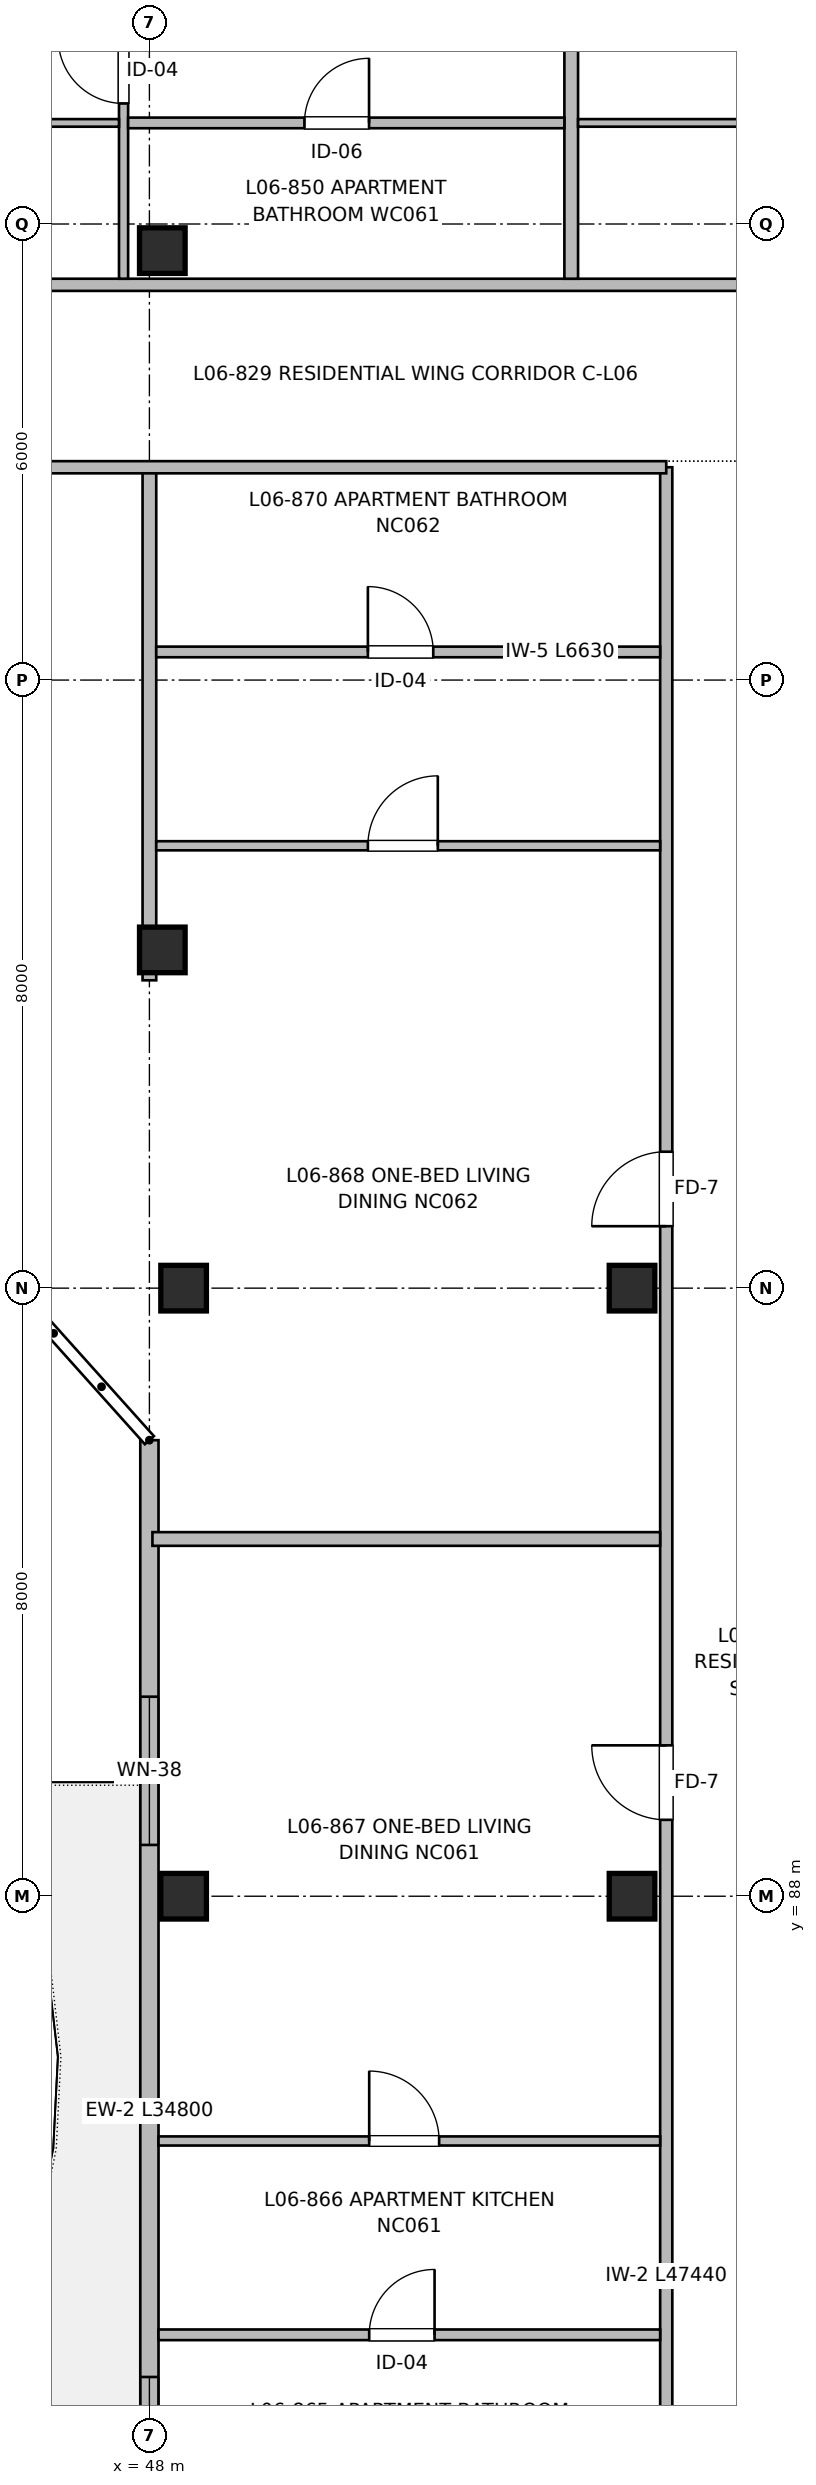
"""IFC4 building model, lengths in metres.
Left out: names, types, materials, properties, quantities, classifications, styles, units other than length and angle.
Written with IfcOpenShell. Run it as: python <this file> out.ifc"""

import sys

from ifc_helpers import new_model, si_unit, direction, frame, frame_2d, origin, origin_2d, place, context, subcontext, project, spatial, rectangle, extrude, element, fill, save


model = new_model("IFC4")
c1 = context("Model", 3, precision=1e-05, world=origin(), true_north=direction((0.0, 1.0)))
c2 = subcontext(c1, "Body", "Model", "MODEL_VIEW")
j1 = project(units=[si_unit("LENGTHUNIT", "METRE"), si_unit("PLANEANGLEUNIT", "RADIAN")], contexts=[c1])
p1 = place(None, origin())
s1 = spatial("IfcSite", under=j1, at=p1, CompositionType="ELEMENT")
p2 = place(p1, origin())
s2 = spatial("IfcBuilding", under=s1, at=p2, CompositionType="ELEMENT")
p3 = place(p2, frame((0.0, 0.0, 20.16)))
s3 = spatial("IfcBuildingStorey", under=s2, at=p3, CompositionType="ELEMENT", Elevation=20.16)
for number, where, z_axis, x_axis in (
    (1, (48.17, 100.45, 0.0), (0.0, 0.0, 1.0), (1.0, 0.0, 0.0)),
    (2, (48.17, 109.65, 0.0), (0.0, 0.0, 1.0), (1.0, 0.0, 0.0)),
    (3, (48.45, 88.0, 0.0), (0.0, 0.0, 1.0), (1.0, 0.0, 0.0)),
    (4, (48.45, 96.0, 0.0), (0.0, 0.0, 1.0), (1.0, 0.0, 0.0)),
    (5, (54.35, 88.0, 0.0), (0.0, 0.0, 1.0), (1.0, 0.0, 0.0)),
    (6, (54.35, 96.0, 0.0), (0.0, 0.0, 1.0), (1.0, 0.0, 0.0)),
):
    element("IfcColumn", number, at=place(p3, frame(where, z_axis=z_axis, x_axis=x_axis)), inside=s3, PredefinedType="COLUMN", context=c2, shape_type="SweptSolid", body=[
        extrude(rectangle(XDim=0.6, YDim=0.6, at=origin_2d()), origin(), (0.0, 0.0, 1.0), 3.2),
    ])
p4 = place(p3, frame((48.0, 59.2, 0.0), z_axis=(0.0, 0.0, 1.0), x_axis=(0.0, 1.0, 0.0)))
e7 = element("IfcWall", 7, at=p4, inside=s3, PredefinedType="SOLIDWALL", context=c2, shape_type="SweptSolid", body=[
    extrude(rectangle(XDim=34.8, YDim=0.24, at=frame_2d((17.4, 0.0))), origin(), (0.0, 0.0, 1.0), 2.98),
])
p5 = place(p4, frame((2.55, 0.0, 0.0)))
e8 = element("IfcOpeningElement", 8, at=p5, cuts=e7, PredefinedType="OPENING", context=c2, shape_type="SweptSolid", body=[
    extrude(rectangle(XDim=1.2, YDim=2.2, at=frame_2d((0.6, 1.1))), frame((0.0, 0.13, 0.0), z_axis=(0.0, -1.0, 0.0), x_axis=(1.0, 0.0, 0.0)), (0.0, 0.0, 1.0), 0.26),
])
p6 = place(p4, frame((5.65, 0.0, 0.77)))
e9 = element("IfcOpeningElement", 9, at=p6, cuts=e7, PredefinedType="OPENING", context=c2, shape_type="SweptSolid", body=[
    extrude(rectangle(XDim=1.65, YDim=1.45, at=frame_2d((0.825, 0.725))), frame((0.0, 0.13, 0.0), z_axis=(0.0, -1.0, 0.0), x_axis=(1.0, 0.0, 0.0)), (0.0, 0.0, 1.0), 0.26),
])
p7 = place(p4, frame((11.9, 0.0, 0.57)))
e10 = element("IfcOpeningElement", 10, at=p7, cuts=e7, PredefinedType="OPENING", context=c2, shape_type="SweptSolid", body=[
    extrude(rectangle(XDim=2.3, YDim=1.65, at=frame_2d((1.15, 0.825))), frame((0.0, 0.13, 0.0), z_axis=(0.0, -1.0, 0.0), x_axis=(1.0, 0.0, 0.0)), (0.0, 0.0, 1.0), 0.26),
])
p8 = place(p4, frame((21.025, 0.0, 0.77)))
e11 = element("IfcOpeningElement", 11, at=p8, cuts=e7, PredefinedType="OPENING", context=c2, shape_type="SweptSolid", body=[
    extrude(rectangle(XDim=1.45, YDim=1.45, at=frame_2d((0.725, 0.725))), frame((0.0, 0.13, 0.0), z_axis=(0.0, -1.0, 0.0), x_axis=(1.0, 0.0, 0.0)), (0.0, 0.0, 1.0), 0.26),
])
p9 = place(p4, frame((29.475, 0.0, 0.72)))
e12 = element("IfcOpeningElement", 12, at=p9, cuts=e7, PredefinedType="OPENING", context=c2, shape_type="SweptSolid", body=[
    extrude(rectangle(XDim=1.95, YDim=1.5, at=frame_2d((0.975, 0.75))), frame((0.0, 0.13, 0.0), z_axis=(0.0, -1.0, 0.0), x_axis=(1.0, 0.0, 0.0)), (0.0, 0.0, 1.0), 0.26),
])
p10 = place(p3, frame((54.8, 59.36, 0.0), z_axis=(0.0, 0.0, 1.0), x_axis=(0.0, 1.0, 0.0)))
e13 = element("IfcWall", 13, at=p10, inside=s3, PredefinedType="PARTITIONING", context=c2, shape_type="SweptSolid", body=[
    extrude(rectangle(XDim=47.44, YDim=0.16, at=frame_2d((23.72, 0.0))), origin(), (0.0, 0.0, 1.0), 2.935),
])
p11 = place(p10, frame((9.64, 0.0, 0.0)))
e14 = element("IfcOpeningElement", 14, at=p11, cuts=e13, PredefinedType="OPENING", context=c2, shape_type="SweptSolid", body=[
    extrude(rectangle(XDim=1.1, YDim=2.15, at=frame_2d((0.55, 1.075))), frame((0.0, 0.09, 0.0), z_axis=(0.0, -1.0, 0.0), x_axis=(1.0, 0.0, 0.0)), (0.0, 0.0, 1.0), 0.18),
])
p12 = place(p10, frame((16.04, 0.0, 0.0)))
e15 = element("IfcOpeningElement", 15, at=p12, cuts=e13, PredefinedType="OPENING", context=c2, shape_type="SweptSolid", body=[
    extrude(rectangle(XDim=1.6, YDim=2.15, at=frame_2d((0.8, 1.075))), frame((0.0, 0.09, 0.0), z_axis=(0.0, -1.0, 0.0), x_axis=(1.0, 0.0, 0.0)), (0.0, 0.0, 1.0), 0.18),
])
p13 = place(p10, frame((1.8, 0.0, 0.0)))
e16 = element("IfcOpeningElement", 16, at=p13, cuts=e13, PredefinedType="OPENING", context=c2, shape_type="SweptSolid", body=[
    extrude(rectangle(XDim=0.96, YDim=2.15, at=frame_2d((0.48, 1.075))), frame((0.0, 0.09, 0.0), z_axis=(0.0, -1.0, 0.0), x_axis=(1.0, 0.0, 0.0)), (0.0, 0.0, 1.0), 0.18),
])
p14 = place(p10, frame((29.645, 0.0, 0.0)))
e17 = element("IfcOpeningElement", 17, at=p14, cuts=e13, PredefinedType="OPENING", context=c2, shape_type="SweptSolid", body=[
    extrude(rectangle(XDim=0.98, YDim=2.15, at=frame_2d((0.49, 1.075))), frame((0.0, 0.09, 0.0), z_axis=(0.0, -1.0, 0.0), x_axis=(1.0, 0.0, 0.0)), (0.0, 0.0, 1.0), 0.18),
])
p15 = place(p10, frame((37.455, 0.0, 0.0)))
e18 = element("IfcOpeningElement", 18, at=p15, cuts=e13, PredefinedType="OPENING", context=c2, shape_type="SweptSolid", body=[
    extrude(rectangle(XDim=0.98, YDim=2.15, at=frame_2d((0.49, 1.075))), frame((0.0, 0.09, 0.0), z_axis=(0.0, -1.0, 0.0), x_axis=(1.0, 0.0, 0.0)), (0.0, 0.0, 1.0), 0.18),
])
p16 = place(p3, frame((39.66, 106.8, 0.0), z_axis=(0.0, 0.0, 1.0), x_axis=(1.0, 0.0, 0.0)))
e19 = element("IfcWall", 19, at=p16, inside=s3, PredefinedType="PARTITIONING", context=c2, shape_type="SweptSolid", body=[
    extrude(rectangle(XDim=15.14, YDim=0.16, at=frame_2d((7.57, 0.0))), origin(), (0.0, 0.0, 1.0), 2.935),
])
p17 = place(p3, frame((39.66, 109.2, 0.0), z_axis=(0.0, 0.0, 1.0), x_axis=(1.0, 0.0, 0.0)))
e20 = element("IfcWall", 20, at=p17, inside=s3, PredefinedType="PARTITIONING", context=c2, shape_type="SweptSolid", body=[
    extrude(rectangle(XDim=41.68, YDim=0.16, at=frame_2d((20.84, 0.0))), origin(), (0.0, 0.0, 1.0), 2.935),
])
p18 = place(p17, frame((3.51, 0.0, 0.0)))
e21 = element("IfcOpeningElement", 21, at=p18, cuts=e20, PredefinedType="OPENING", context=c2, shape_type="SweptSolid", body=[
    extrude(rectangle(XDim=0.98, YDim=2.15, at=frame_2d((0.49, 1.075))), frame((0.0, 0.09, 0.0), z_axis=(0.0, -1.0, 0.0), x_axis=(1.0, 0.0, 0.0)), (0.0, 0.0, 1.0), 0.18),
])
p19 = place(p17, frame((17.47, 0.0, 0.0)))
e22 = element("IfcOpeningElement", 22, at=p19, cuts=e20, PredefinedType="OPENING", context=c2, shape_type="SweptSolid", body=[
    extrude(rectangle(XDim=0.98, YDim=2.15, at=frame_2d((0.49, 1.075))), frame((0.0, 0.09, 0.0), z_axis=(0.0, -1.0, 0.0), x_axis=(1.0, 0.0, 0.0)), (0.0, 0.0, 1.0), 0.18),
])
p20 = place(p17, frame((31.39, 0.0, 0.0)))
e23 = element("IfcOpeningElement", 23, at=p20, cuts=e20, PredefinedType="OPENING", context=c2, shape_type="SweptSolid", body=[
    extrude(rectangle(XDim=0.98, YDim=2.15, at=frame_2d((0.49, 1.075))), frame((0.0, 0.09, 0.0), z_axis=(0.0, -1.0, 0.0), x_axis=(1.0, 0.0, 0.0)), (0.0, 0.0, 1.0), 0.18),
])
p21 = place(p3, frame((48.0, 100.05, 0.0), z_axis=(0.0, 0.0, 1.0), x_axis=(0.0, 1.0, 0.0)))
e24 = element("IfcWall", 24, at=p21, inside=s3, PredefinedType="PARTITIONING", context=c2, shape_type="SweptSolid", body=[
    extrude(rectangle(XDim=6.67, YDim=0.18, at=frame_2d((3.335, 0.0))), origin(), (0.0, 0.0, 1.0), 2.68),
])
p22 = place(p3, frame((53.55, 109.28, 0.0), z_axis=(0.0, 0.0, 1.0), x_axis=(0.0, 1.0, 0.0)))
e25 = element("IfcWall", 25, at=p22, inside=s3, PredefinedType="PARTITIONING", context=c2, shape_type="SweptSolid", body=[
    extrude(rectangle(XDim=6.6, YDim=0.18, at=frame_2d((3.3, 0.0))), origin(), (0.0, 0.0, 1.0), 2.935),
])
p23 = place(p3, frame((47.66, 109.28, 0.0), z_axis=(0.0, 0.0, 1.0), x_axis=(0.0, 1.0, 0.0)))
e26 = element("IfcWall", 26, at=p23, inside=s3, PredefinedType="PARTITIONING", context=c2, shape_type="SweptSolid", body=[
    extrude(rectangle(XDim=6.6, YDim=0.12, at=frame_2d((3.3, 0.0))), origin(), (0.0, 0.0, 1.0), 2.935),
])
p24 = place(p23, frame((2.306, 0.0, 0.0)))
e27 = element("IfcOpeningElement", 27, at=p24, cuts=e26, PredefinedType="OPENING", context=c2, shape_type="SweptSolid", body=[
    extrude(rectangle(XDim=0.86, YDim=2.1, at=frame_2d((0.43, 1.05))), frame((0.0, 0.07, 0.0), z_axis=(0.0, -1.0, 0.0), x_axis=(1.0, 0.0, 0.0)), (0.0, 0.0, 1.0), 0.14),
])
p25 = place(p23, frame((4.097, 0.0, 0.0)))
e28 = element("IfcOpeningElement", 28, at=p25, cuts=e26, PredefinedType="OPENING", context=c2, shape_type="SweptSolid", body=[
    extrude(rectangle(XDim=0.9, YDim=2.1, at=frame_2d((0.45, 1.05))), frame((0.0, 0.07, 0.0), z_axis=(0.0, -1.0, 0.0), x_axis=(1.0, 0.0, 0.0)), (0.0, 0.0, 1.0), 0.14),
])
p26 = place(p3, frame((47.72, 111.33, 0.0), z_axis=(0.0, 0.0, 1.0), x_axis=(1.0, 0.0, 0.0)))
e29 = element("IfcWall", 29, at=p26, inside=s3, PredefinedType="PARTITIONING", context=c2, shape_type="SweptSolid", body=[
    extrude(rectangle(XDim=5.74, YDim=0.14, at=frame_2d((2.87, 0.0))), origin(), (0.0, 0.0, 1.0), 2.935),
])
p27 = place(p26, frame((2.32, 0.0, 0.0)))
e30 = element("IfcOpeningElement", 30, at=p27, cuts=e29, PredefinedType="OPENING", context=c2, shape_type="SweptSolid", body=[
    extrude(rectangle(XDim=0.85, YDim=2.05, at=frame_2d((0.425, 1.025))), frame((0.0, 0.08, 0.0), z_axis=(0.0, -1.0, 0.0), x_axis=(1.0, 0.0, 0.0)), (0.0, 0.0, 1.0), 0.16),
])
p28 = place(p3, frame((39.66, 111.33, 0.0), z_axis=(0.0, 0.0, 1.0), x_axis=(1.0, 0.0, 0.0)))
e31 = element("IfcWall", 31, at=p28, inside=s3, PredefinedType="PARTITIONING", context=c2, shape_type="SweptSolid", body=[
    extrude(rectangle(XDim=7.94, YDim=0.1, at=frame_2d((3.97, 0.0))), origin(), (0.0, 0.0, 1.0), 2.935),
])
p29 = place(p28, frame((3.2, 0.0, 0.0)))
e32 = element("IfcOpeningElement", 32, at=p29, cuts=e31, PredefinedType="OPENING", context=c2, shape_type="SweptSolid", body=[
    extrude(rectangle(XDim=0.92, YDim=2.1, at=frame_2d((0.46, 1.05))), frame((0.0, 0.06, 0.0), z_axis=(0.0, -1.0, 0.0), x_axis=(1.0, 0.0, 0.0)), (0.0, 0.0, 1.0), 0.12),
])
p30 = place(p3, frame((53.64, 111.33, 0.0), z_axis=(0.0, 0.0, 1.0), x_axis=(1.0, 0.0, 0.0)))
e33 = element("IfcWall", 33, at=p30, inside=s3, PredefinedType="PARTITIONING", context=c2, shape_type="SweptSolid", body=[
    extrude(rectangle(XDim=7.9, YDim=0.1, at=frame_2d((3.95, 0.0))), origin(), (0.0, 0.0, 1.0), 2.935),
])
p31 = place(p30, frame((3.184, 0.0, 0.0)))
e34 = element("IfcOpeningElement", 34, at=p31, cuts=e33, PredefinedType="OPENING", context=c2, shape_type="SweptSolid", body=[
    extrude(rectangle(XDim=0.92, YDim=2.1, at=frame_2d((0.46, 1.05))), frame((0.0, 0.06, 0.0), z_axis=(0.0, -1.0, 0.0), x_axis=(1.0, 0.0, 0.0)), (0.0, 0.0, 1.0), 0.12),
])
p32 = place(p3, frame((48.04, 92.7, 0.0), z_axis=(0.0, 0.0, 1.0), x_axis=(1.0, 0.0, 0.0)))
e35 = element("IfcWall", 35, at=p32, inside=s3, PredefinedType="PARTITIONING", context=c2, shape_type="SweptSolid", body=[
    extrude(rectangle(XDim=6.68, YDim=0.18, at=frame_2d((3.34, 0.0))), origin(), (0.0, 0.0, 1.0), 2.935),
])
p33 = place(p3, frame((48.12, 82.23, 0.0), z_axis=(0.0, 0.0, 1.0), x_axis=(1.0, 0.0, 0.0)))
e36 = element("IfcWall", 36, at=p33, inside=s3, PredefinedType="PARTITIONING", context=c2, shape_type="SweptSolid", body=[
    extrude(rectangle(XDim=6.6, YDim=0.14, at=frame_2d((3.3, 0.0))), origin(), (0.0, 0.0, 1.0), 2.935),
])
p34 = place(p33, frame((2.772, 0.0, 0.0)))
e37 = element("IfcOpeningElement", 37, at=p34, cuts=e36, PredefinedType="OPENING", context=c2, shape_type="SweptSolid", body=[
    extrude(rectangle(XDim=0.86, YDim=2.1, at=frame_2d((0.43, 1.05))), frame((0.0, 0.08, 0.0), z_axis=(0.0, -1.0, 0.0), x_axis=(1.0, 0.0, 0.0)), (0.0, 0.0, 1.0), 0.16),
])
p35 = place(p3, frame((48.12, 84.78, 0.0), z_axis=(0.0, 0.0, 1.0), x_axis=(1.0, 0.0, 0.0)))
e38 = element("IfcWall", 38, at=p35, inside=s3, PredefinedType="PARTITIONING", context=c2, shape_type="SweptSolid", body=[
    extrude(rectangle(XDim=6.6, YDim=0.12, at=frame_2d((3.3, 0.0))), origin(), (0.0, 0.0, 1.0), 2.935),
])
p36 = place(p35, frame((2.772, 0.0, 0.0)))
e39 = element("IfcOpeningElement", 39, at=p36, cuts=e38, PredefinedType="OPENING", context=c2, shape_type="SweptSolid", body=[
    extrude(rectangle(XDim=0.92, YDim=2.1, at=frame_2d((0.46, 1.05))), frame((0.0, 0.07, 0.0), z_axis=(0.0, -1.0, 0.0), x_axis=(1.0, 0.0, 0.0)), (0.0, 0.0, 1.0), 0.14),
])
p37 = place(p3, frame((48.09, 101.82, 0.0), z_axis=(0.0, 0.0, 1.0), x_axis=(1.0, 0.0, 0.0)))
e40 = element("IfcWall", 40, at=p37, inside=s3, PredefinedType="PARTITIONING", context=c2, shape_type="SweptSolid", body=[
    extrude(rectangle(XDim=6.63, YDim=0.12, at=frame_2d((3.315, 0.0))), origin(), (0.0, 0.0, 1.0), 2.935),
])
p38 = place(p37, frame((2.785, 0.0, 0.0)))
e41 = element("IfcOpeningElement", 41, at=p38, cuts=e40, PredefinedType="OPENING", context=c2, shape_type="SweptSolid", body=[
    extrude(rectangle(XDim=0.92, YDim=2.1, at=frame_2d((0.46, 1.05))), frame((0.0, 0.07, 0.0), z_axis=(0.0, -1.0, 0.0), x_axis=(1.0, 0.0, 0.0)), (0.0, 0.0, 1.0), 0.14),
])
p39 = place(p3, frame((48.09, 104.37, 0.0), z_axis=(0.0, 0.0, 1.0), x_axis=(1.0, 0.0, 0.0)))
e42 = element("IfcWall", 42, at=p39, inside=s3, PredefinedType="PARTITIONING", context=c2, shape_type="SweptSolid", body=[
    extrude(rectangle(XDim=6.63, YDim=0.14, at=frame_2d((3.315, 0.0))), origin(), (0.0, 0.0, 1.0), 2.935),
])
p40 = place(p39, frame((2.785, 0.0, 0.0)))
e43 = element("IfcOpeningElement", 43, at=p40, cuts=e42, PredefinedType="OPENING", context=c2, shape_type="SweptSolid", body=[
    extrude(rectangle(XDim=0.86, YDim=2.1, at=frame_2d((0.43, 1.05))), frame((0.0, 0.08, 0.0), z_axis=(0.0, -1.0, 0.0), x_axis=(1.0, 0.0, 0.0)), (0.0, 0.0, 1.0), 0.16),
])
p41 = place(p8, origin())
e44 = element("IfcWindow", 44, at=p41, inside=s3, PartitioningType="SINGLE_PANEL", PredefinedType="WINDOW", context=c2, shape_type="SweptSolid", body=[
    extrude(rectangle(XDim=1.45, YDim=1.45, at=frame_2d((0.725, 0.725))), frame((0.0, 0.03, 0.0), z_axis=(0.0, -1.0, 0.0), x_axis=(1.0, 0.0, 0.0)), (0.0, 0.0, 1.0), 0.06),
])
fill(e11, e44)
p42 = place(p9, origin())
e45 = element("IfcWindow", 45, at=p42, inside=s3, PartitioningType="SINGLE_PANEL", PredefinedType="WINDOW", context=c2, shape_type="SweptSolid", body=[
    extrude(rectangle(XDim=1.95, YDim=1.5, at=frame_2d((0.975, 0.75))), frame((0.0, 0.03, 0.0), z_axis=(0.0, -1.0, 0.0), x_axis=(1.0, 0.0, 0.0)), (0.0, 0.0, 1.0), 0.06),
])
fill(e12, e45)
p43 = place(p24, origin())
e46 = element("IfcDoor", 46, at=p43, inside=s3, OperationType="SINGLE_SWING_RIGHT", PredefinedType="DOOR", context=c2, shape_type="SweptSolid", body=[
    extrude(rectangle(XDim=0.86, YDim=2.1, at=frame_2d((0.43, 1.05))), frame((0.0, 0.025, 0.0), z_axis=(0.0, -1.0, 0.0), x_axis=(1.0, 0.0, 0.0)), (0.0, 0.0, 1.0), 0.05),
])
fill(e27, e46)
p44 = place(p27, origin())
e47 = element("IfcDoor", 47, at=p44, inside=s3, OperationType="SINGLE_SWING_RIGHT", PredefinedType="DOOR", context=c2, shape_type="SweptSolid", body=[
    extrude(rectangle(XDim=0.85, YDim=2.05, at=frame_2d((0.425, 1.025))), frame((0.0, 0.025, 0.0), z_axis=(0.0, -1.0, 0.0), x_axis=(1.0, 0.0, 0.0)), (0.0, 0.0, 1.0), 0.05),
])
fill(e30, e47)
p45 = place(p34, origin())
e48 = element("IfcDoor", 48, at=p45, inside=s3, OperationType="SINGLE_SWING_RIGHT", PredefinedType="DOOR", context=c2, shape_type="SweptSolid", body=[
    extrude(rectangle(XDim=0.86, YDim=2.1, at=frame_2d((0.43, 1.05))), frame((0.0, 0.025, 0.0), z_axis=(0.0, -1.0, 0.0), x_axis=(1.0, 0.0, 0.0)), (0.0, 0.0, 1.0), 0.05),
])
fill(e37, e48)
p46 = place(p36, origin())
e49 = element("IfcDoor", 49, at=p46, inside=s3, OperationType="SINGLE_SWING_LEFT", PredefinedType="DOOR", context=c2, shape_type="SweptSolid", body=[
    extrude(rectangle(XDim=0.92, YDim=2.1, at=frame_2d((0.46, 1.05))), frame((0.0, 0.025, 0.0), z_axis=(0.0, -1.0, 0.0), x_axis=(1.0, 0.0, 0.0)), (0.0, 0.0, 1.0), 0.05),
])
fill(e39, e49)
p47 = place(p14, origin())
e50 = element("IfcDoor", 50, at=p47, inside=s3, OperationType="SINGLE_SWING_RIGHT", PredefinedType="DOOR", context=c2, shape_type="SweptSolid", body=[
    extrude(rectangle(XDim=0.98, YDim=2.15, at=frame_2d((0.49, 1.075))), frame((0.0, 0.025, 0.0), z_axis=(0.0, -1.0, 0.0), x_axis=(1.0, 0.0, 0.0)), (0.0, 0.0, 1.0), 0.05),
])
fill(e17, e50)
p48 = place(p40, origin())
e51 = element("IfcDoor", 51, at=p48, inside=s3, OperationType="SINGLE_SWING_LEFT", PredefinedType="DOOR", context=c2, shape_type="SweptSolid", body=[
    extrude(rectangle(XDim=0.86, YDim=2.1, at=frame_2d((0.43, 1.05))), frame((0.0, 0.025, 0.0), z_axis=(0.0, -1.0, 0.0), x_axis=(1.0, 0.0, 0.0)), (0.0, 0.0, 1.0), 0.05),
])
fill(e43, e51)
p49 = place(p38, origin())
e52 = element("IfcDoor", 52, at=p49, inside=s3, OperationType="SINGLE_SWING_RIGHT", PredefinedType="DOOR", context=c2, shape_type="SweptSolid", body=[
    extrude(rectangle(XDim=0.92, YDim=2.1, at=frame_2d((0.46, 1.05))), frame((0.0, 0.025, 0.0), z_axis=(0.0, -1.0, 0.0), x_axis=(1.0, 0.0, 0.0)), (0.0, 0.0, 1.0), 0.05),
])
fill(e41, e52)
p50 = place(p15, origin())
e53 = element("IfcDoor", 53, at=p50, inside=s3, OperationType="SINGLE_SWING_LEFT", PredefinedType="DOOR", context=c2, shape_type="SweptSolid", body=[
    extrude(rectangle(XDim=0.98, YDim=2.15, at=frame_2d((0.49, 1.075))), frame((0.0, 0.025, 0.0), z_axis=(0.0, -1.0, 0.0), x_axis=(1.0, 0.0, 0.0)), (0.0, 0.0, 1.0), 0.05),
])
fill(e18, e53)
save(model, sys.argv[1])
